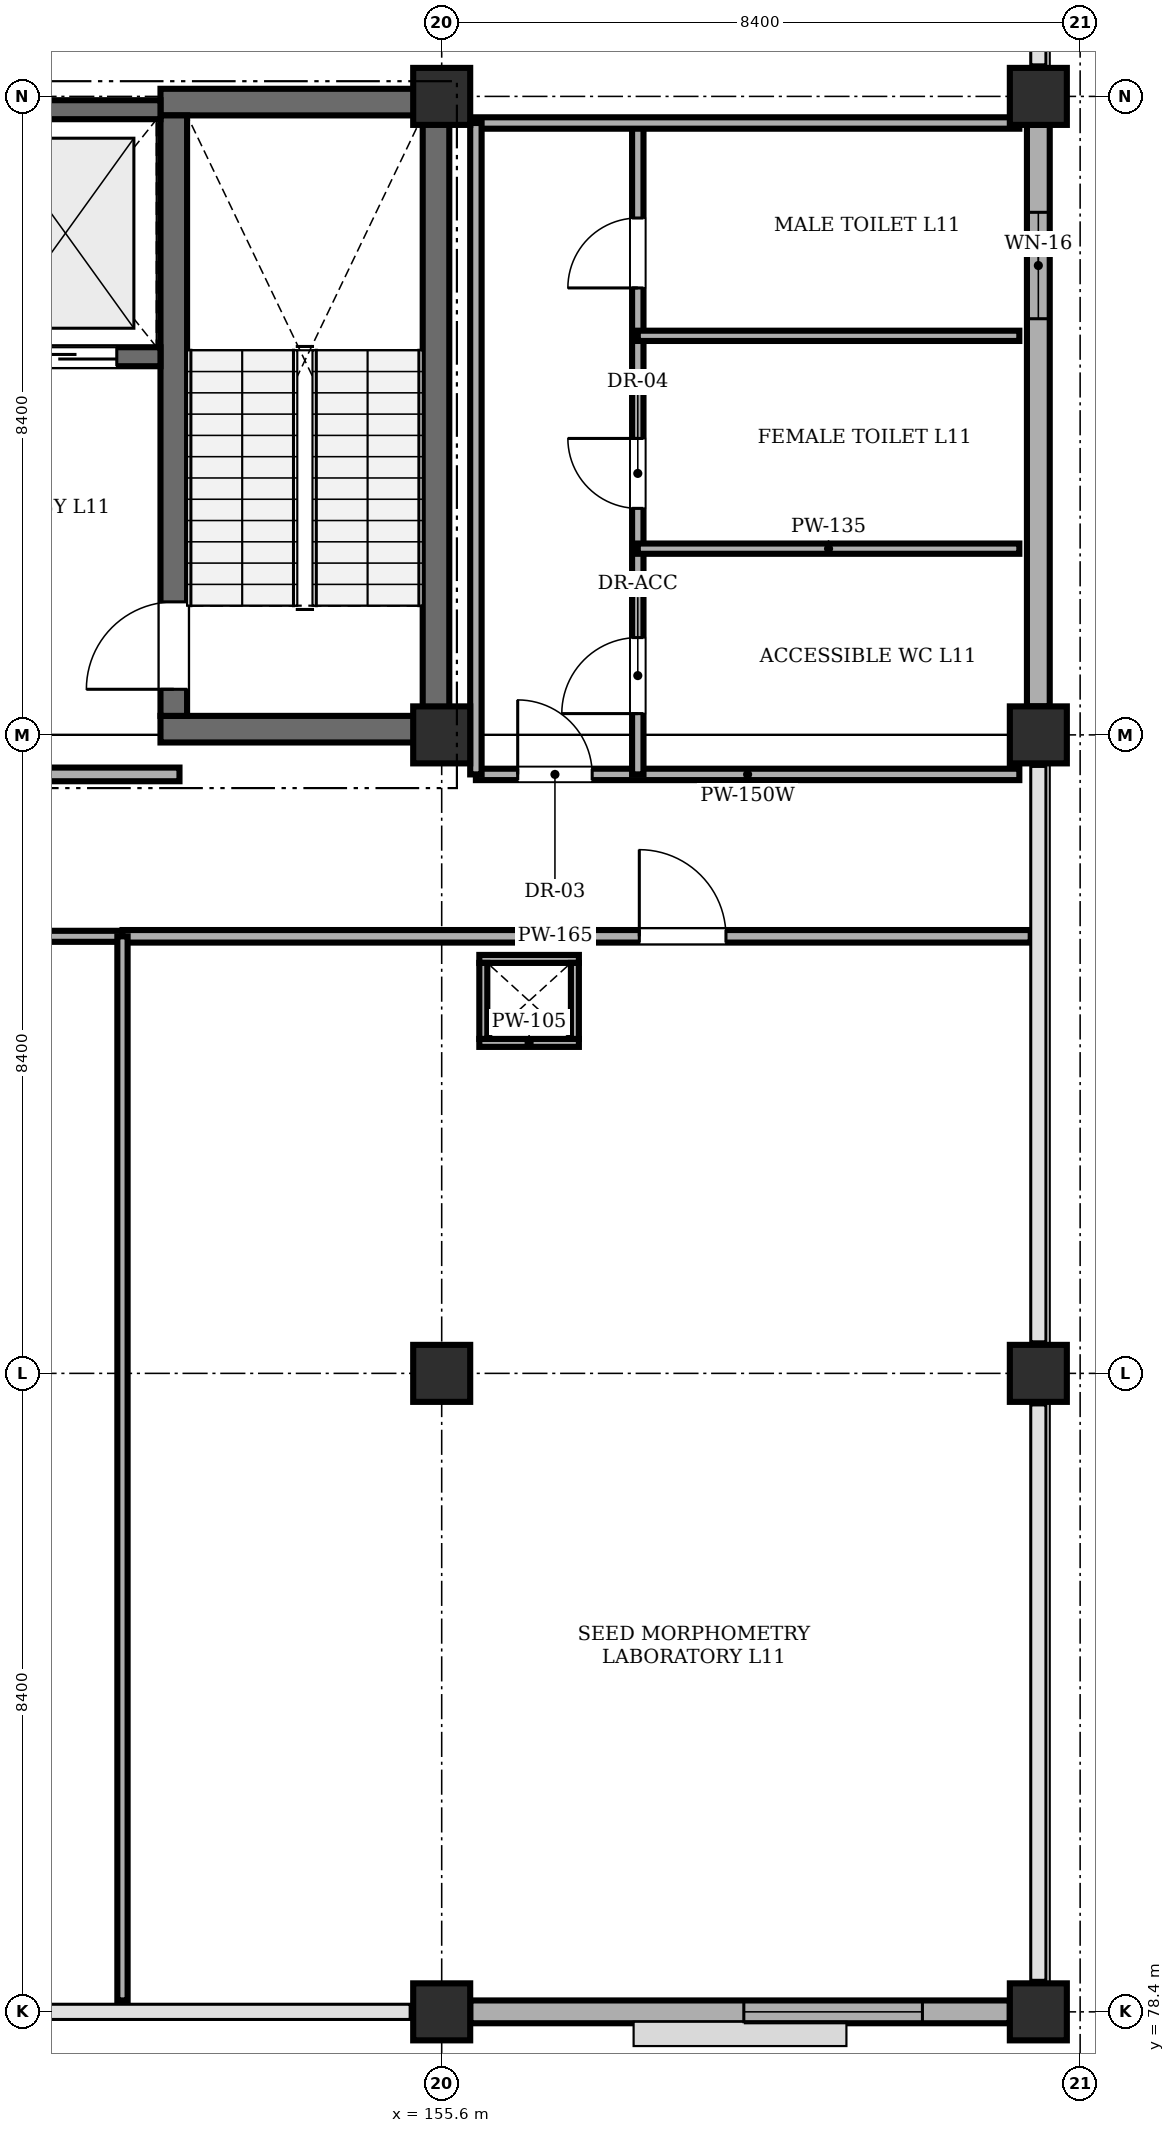
"""IFC4 building model, lengths in metres.
Left out: names, types, materials, properties, quantities, classifications, styles, units other than length and angle.
Written with IfcOpenShell. Run it as: python <this file> out.ifc"""

import sys

from ifc_helpers import new_model, si_unit, direction, frame, frame_2d, origin, origin_2d, place, context, subcontext, project, spatial, rectangle, extrude, element, fill, save


model = new_model("IFC4")
c1 = context("Model", 3, precision=1e-05, world=origin(), true_north=direction((0.0, 1.0)))
c2 = subcontext(c1, "Body", "Model", "MODEL_VIEW")
j1 = project(units=[si_unit("LENGTHUNIT", "METRE"), si_unit("PLANEANGLEUNIT", "RADIAN")], contexts=[c1])
p1 = place(None, origin())
s1 = spatial("IfcSite", under=j1, at=p1, CompositionType="ELEMENT")
p2 = place(p1, origin())
s2 = spatial("IfcBuilding", under=s1, at=p2, CompositionType="ELEMENT")
p3 = place(p2, frame((0.0, 0.0, 44.4)))
s3 = spatial("IfcBuildingStorey", under=s2, at=p3, CompositionType="ELEMENT", Elevation=44.4)
for number, where, z_axis, x_axis in (
    (1, (155.6, 78.4, 0.0), (0.0, 0.0, 1.0), (1.0, 0.0, 0.0)),
    (2, (155.6, 86.8, 0.0), (0.0, 0.0, 1.0), (1.0, 0.0, 0.0)),
    (3, (155.6, 95.2, 0.0), (0.0, 0.0, 1.0), (1.0, 0.0, 0.0)),
    (4, (155.6, 103.6, 0.0), (0.0, 0.0, 1.0), (1.0, 0.0, 0.0)),
    (5, (163.45, 78.4, 0.0), (0.0, 0.0, 1.0), (1.0, 0.0, 0.0)),
    (6, (163.45, 86.8, 0.0), (0.0, 0.0, 1.0), (1.0, 0.0, 0.0)),
    (7, (163.45, 95.2, 0.0), (0.0, 0.0, 1.0), (1.0, 0.0, 0.0)),
    (8, (163.45, 103.6, 0.0), (0.0, 0.0, 1.0), (1.0, 0.0, 0.0)),
):
    element("IfcColumn", number, at=place(p3, frame(where, z_axis=z_axis, x_axis=x_axis)), inside=s3, PredefinedType="COLUMN", context=c2, shape_type="SweptSolid", body=[
        extrude(rectangle(XDim=0.75, YDim=0.75, at=origin_2d()), origin(), (0.0, 0.0, 1.0), 4.01),
    ])
for number, where, z_axis, x_axis in (
    (9, (151.9, 95.275, 0.0), (0.0, 0.0, 1.0), (1.0, 0.0, 0.0)),
    (10, (151.9, 103.525, 0.0), (0.0, 0.0, 1.0), (1.0, 0.0, 0.0)),
):
    element("IfcWall", number, at=place(p3, frame(where, z_axis=z_axis, x_axis=x_axis)), inside=s3, PredefinedType="SHEAR", context=c2, shape_type="SweptSolid", body=[
        extrude(rectangle(XDim=3.8, YDim=0.35, at=frame_2d((1.9, 0.0))), origin(), (0.0, 0.0, 1.0), 4.01),
    ])
p4 = place(p3, frame((152.075, 95.45, 0.0), z_axis=(0.0, 0.0, 1.0), x_axis=(0.0, 1.0, 0.0)))
e11 = element("IfcWall", 11, at=p4, inside=s3, PredefinedType="SHEAR", context=c2, shape_type="SweptSolid", body=[
    extrude(rectangle(XDim=7.9, YDim=0.35, at=frame_2d((3.95, 0.0))), origin(), (0.0, 0.0, 1.0), 4.01),
])
p5 = place(p4, frame((0.35, 0.0, 0.0)))
e12 = element("IfcOpeningElement", 12, at=p5, cuts=e11, PredefinedType="OPENING", context=c2, shape_type="SweptSolid", body=[
    extrude(rectangle(XDim=1.15, YDim=2.15, at=frame_2d((0.575, 1.075))), frame((0.0, 0.185, 0.0), z_axis=(0.0, -1.0, 0.0), x_axis=(1.0, 0.0, 0.0)), (0.0, 0.0, 1.0), 0.37),
])
p6 = place(p3, frame((155.525, 95.45, 0.0), z_axis=(0.0, 0.0, 1.0), x_axis=(0.0, 1.0, 0.0)))
e13 = element("IfcWall", 13, at=p6, inside=s3, PredefinedType="SHEAR", context=c2, shape_type="SweptSolid", body=[
    extrude(rectangle(XDim=7.9, YDim=0.35, at=frame_2d((3.95, 0.0))), origin(), (0.0, 0.0, 1.0), 4.01),
])
p7 = place(p3, frame((149.45, 100.175, 0.0), z_axis=(0.0, 0.0, 1.0), x_axis=(1.0, 0.0, 0.0)))
e14 = element("IfcWall", 14, at=p7, inside=s3, PredefinedType="SHEAR", context=c2, shape_type="SweptSolid", body=[
    extrude(rectangle(XDim=2.45, YDim=0.25, at=frame_2d((1.225, 0.0))), origin(), (0.0, 0.0, 1.0), 4.01),
])
p8 = place(p7, frame((0.575, 0.0, 0.0)))
e15 = element("IfcOpeningElement", 15, at=p8, cuts=e14, PredefinedType="OPENING", context=c2, shape_type="SweptSolid", body=[
    extrude(rectangle(XDim=1.3, YDim=2.25, at=frame_2d((0.65, 1.125))), frame((0.0, 0.135, 0.0), z_axis=(0.0, -1.0, 0.0), x_axis=(1.0, 0.0, 0.0)), (0.0, 0.0, 1.0), 0.27),
])
p9 = place(p3, frame((149.45, 103.425, 0.0), z_axis=(0.0, 0.0, 1.0), x_axis=(1.0, 0.0, 0.0)))
e16 = element("IfcWall", 16, at=p9, inside=s3, PredefinedType="SHEAR", context=c2, shape_type="SweptSolid", body=[
    extrude(rectangle(XDim=2.45, YDim=0.25, at=frame_2d((1.225, 0.0))), origin(), (0.0, 0.0, 1.0), 4.01),
])
p10 = place(p3, frame((163.075, 78.4, 0.0), z_axis=(0.0, 0.0, 1.0), x_axis=(-1.0, 0.0, 0.0)))
e17 = element("IfcWall", 17, at=p10, inside=s3, PredefinedType="STANDARD", context=c2, shape_type="SweptSolid", body=[
    extrude(rectangle(XDim=7.1, YDim=0.3, at=frame_2d((3.55, 0.0))), origin(), (0.0, 0.0, 1.0), 3.31),
])
p11 = place(p10, frame((1.15, 0.0, 0.95)))
e18 = element("IfcOpeningElement", 18, at=p11, cuts=e17, PredefinedType="OPENING", context=c2, shape_type="SweptSolid", body=[
    extrude(rectangle(XDim=2.35, YDim=1.95, at=frame_2d((1.175, 0.975))), frame((0.0, 0.16, 0.0), z_axis=(0.0, -1.0, 0.0), x_axis=(1.0, 0.0, 0.0)), (0.0, 0.0, 1.0), 0.32),
])
p12 = place(p3, frame((163.45, 103.225, 0.0), z_axis=(0.0, 0.0, 1.0), x_axis=(0.0, -1.0, 0.0)))
e19 = element("IfcWall", 19, at=p12, inside=s3, PredefinedType="STANDARD", context=c2, shape_type="SweptSolid", body=[
    extrude(rectangle(XDim=7.65, YDim=0.3, at=frame_2d((3.825, 0.0))), origin(), (0.0, 0.0, 1.0), 3.31),
])
p13 = place(p12, frame((1.15, 0.0, 1.1)))
e20 = element("IfcOpeningElement", 20, at=p13, cuts=e19, PredefinedType="OPENING", context=c2, shape_type="SweptSolid", body=[
    extrude(rectangle(XDim=1.4, YDim=1.4, at=frame_2d((0.7, 0.7))), frame((0.0, 0.16, 0.0), z_axis=(0.0, -1.0, 0.0), x_axis=(1.0, 0.0, 0.0)), (0.0, 0.0, 1.0), 0.32),
])
p14 = place(p3, frame((147.3, 94.68, 0.0), z_axis=(0.0, 0.0, 1.0), x_axis=(1.0, 0.0, 0.0)))
e21 = element("IfcWall", 21, at=p14, inside=s3, PredefinedType="STANDARD", context=c2, shape_type="SweptSolid", body=[
    extrude(rectangle(XDim=4.85, YDim=0.18, at=frame_2d((2.425, 0.0))), origin(), (0.0, 0.0, 1.0), 4.01),
])
p15 = place(p14, frame((1.6, 0.0, 0.0)))
e22 = element("IfcOpeningElement", 22, at=p15, cuts=e21, PredefinedType="OPENING", context=c2, shape_type="SweptSolid", body=[
    extrude(rectangle(XDim=1.15, YDim=2.15, at=frame_2d((0.575, 1.075))), frame((0.0, 0.1, 0.0), z_axis=(0.0, -1.0, 0.0), x_axis=(1.0, 0.0, 0.0)), (0.0, 0.0, 1.0), 0.2),
])
p16 = place(p3, frame((156.05, 94.68, 0.0), z_axis=(0.0, 0.0, 1.0), x_axis=(1.0, 0.0, 0.0)))
e23 = element("IfcWall", 23, at=p16, inside=s3, PredefinedType="PARTITIONING", context=c2, shape_type="SweptSolid", body=[
    extrude(rectangle(XDim=7.15, YDim=0.15, at=frame_2d((3.575, 0.0))), origin(), (0.0, 0.0, 1.0), 4.01),
])
p17 = place(p16, frame((0.55, 0.0, 0.0)))
e24 = element("IfcOpeningElement", 24, at=p17, cuts=e23, PredefinedType="OPENING", context=c2, shape_type="SweptSolid", body=[
    extrude(rectangle(XDim=0.98, YDim=2.12, at=frame_2d((0.49, 1.06))), frame((0.0, 0.085, 0.0), z_axis=(0.0, -1.0, 0.0), x_axis=(1.0, 0.0, 0.0)), (0.0, 0.0, 1.0), 0.17),
])
p18 = place(p3, frame((158.18, 94.68, 0.0), z_axis=(0.0, 0.0, 1.0), x_axis=(0.0, 1.0, 0.0)))
e25 = element("IfcWall", 25, at=p18, inside=s3, PredefinedType="PARTITIONING", context=c2, shape_type="SweptSolid", body=[
    extrude(rectangle(XDim=8.57, YDim=0.15, at=frame_2d((4.285, 0.0))), origin(), (0.0, 0.0, 1.0), 4.01),
])
p19 = place(p18, frame((0.8, 0.0, 0.0)))
e26 = element("IfcOpeningElement", 26, at=p19, cuts=e25, PredefinedType="OPENING", context=c2, shape_type="SweptSolid", body=[
    extrude(rectangle(XDim=1.0, YDim=2.12, at=frame_2d((0.5, 1.06))), frame((0.0, 0.085, 0.0), z_axis=(0.0, -1.0, 0.0), x_axis=(1.0, 0.0, 0.0)), (0.0, 0.0, 1.0), 0.17),
])
p20 = place(p18, frame((3.5, 0.0, 0.0)))
e27 = element("IfcOpeningElement", 27, at=p20, cuts=e25, PredefinedType="OPENING", context=c2, shape_type="SweptSolid", body=[
    extrude(rectangle(XDim=0.92, YDim=2.1, at=frame_2d((0.46, 1.05))), frame((0.0, 0.085, 0.0), z_axis=(0.0, -1.0, 0.0), x_axis=(1.0, 0.0, 0.0)), (0.0, 0.0, 1.0), 0.17),
])
p21 = place(p18, frame((6.4, 0.0, 0.0)))
e28 = element("IfcOpeningElement", 28, at=p21, cuts=e25, PredefinedType="OPENING", context=c2, shape_type="SweptSolid", body=[
    extrude(rectangle(XDim=0.92, YDim=2.1, at=frame_2d((0.46, 1.05))), frame((0.0, 0.085, 0.0), z_axis=(0.0, -1.0, 0.0), x_axis=(1.0, 0.0, 0.0)), (0.0, 0.0, 1.0), 0.17),
])
for number, where, z_axis, x_axis in (
    (29, (158.18, 97.65, 0.0), (0.0, 0.0, 1.0), (1.0, 0.0, 0.0)),
    (30, (158.18, 100.45, 0.0), (0.0, 0.0, 1.0), (1.0, 0.0, 0.0)),
):
    element("IfcWall", number, at=place(p3, frame(where, z_axis=z_axis, x_axis=x_axis)), inside=s3, PredefinedType="PARTITIONING", context=c2, shape_type="SweptSolid", body=[
        extrude(rectangle(XDim=5.02, YDim=0.135, at=frame_2d((2.51, 0.0))), origin(), (0.0, 0.0, 1.0), 4.01),
    ])
p22 = place(p3, frame((156.05, 103.25, 0.0), z_axis=(0.0, 0.0, 1.0), x_axis=(1.0, 0.0, 0.0)))
e31 = element("IfcWall", 31, at=p22, inside=s3, PredefinedType="PARTITIONING", context=c2, shape_type="SweptSolid", body=[
    extrude(rectangle(XDim=7.15, YDim=0.15, at=frame_2d((3.575, 0.0))), origin(), (0.0, 0.0, 1.0), 4.01),
])
p23 = place(p3, frame((156.05, 94.68, 0.0), z_axis=(0.0, 0.0, 1.0), x_axis=(0.0, 1.0, 0.0)))
e32 = element("IfcWall", 32, at=p23, inside=s3, PredefinedType="PARTITIONING", context=c2, shape_type="SweptSolid", body=[
    extrude(rectangle(XDim=8.57, YDim=0.15, at=frame_2d((4.285, 0.0))), origin(), (0.0, 0.0, 1.0), 4.01),
])
p24 = place(p3, frame((138.95, 92.55, 0.0), z_axis=(0.0, 0.0, 1.0), x_axis=(1.0, 0.0, 0.0)))
e33 = element("IfcWall", 33, at=p24, inside=s3, PredefinedType="PARTITIONING", context=c2, shape_type="SweptSolid", body=[
    extrude(rectangle(XDim=12.45, YDim=0.145, at=frame_2d((6.225, 0.0))), origin(), (0.0, 0.0, 1.0), 4.01),
])
p25 = place(p24, frame((3.65, 0.0, 0.0)))
e34 = element("IfcOpeningElement", 34, at=p25, cuts=e33, PredefinedType="OPENING", context=c2, shape_type="SweptSolid", body=[
    extrude(rectangle(XDim=1.08, YDim=2.15, at=frame_2d((0.54, 1.075))), frame((0.0, 0.083, 0.0), z_axis=(0.0, -1.0, 0.0), x_axis=(1.0, 0.0, 0.0)), (0.0, 0.0, 1.0), 0.165),
])
p26 = place(p3, frame((151.4, 92.55, 0.0), z_axis=(0.0, 0.0, 1.0), x_axis=(1.0, 0.0, 0.0)))
e35 = element("IfcWall", 35, at=p26, inside=s3, PredefinedType="PARTITIONING", context=c2, shape_type="SweptSolid", body=[
    extrude(rectangle(XDim=11.95, YDim=0.165, at=frame_2d((5.975, 0.0))), origin(), (0.0, 0.0, 1.0), 4.01),
])
p27 = place(p26, frame((6.8, 0.0, 0.0)))
e36 = element("IfcOpeningElement", 36, at=p27, cuts=e35, PredefinedType="OPENING", context=c2, shape_type="SweptSolid", body=[
    extrude(rectangle(XDim=1.14, YDim=2.18, at=frame_2d((0.57, 1.09))), frame((0.0, 0.093, 0.0), z_axis=(0.0, -1.0, 0.0), x_axis=(1.0, 0.0, 0.0)), (0.0, 0.0, 1.0), 0.185),
])
p28 = place(p3, frame((151.4, 78.55, 0.0), z_axis=(0.0, 0.0, 1.0), x_axis=(0.0, 1.0, 0.0)))
e37 = element("IfcWall", 37, at=p28, inside=s3, PredefinedType="PARTITIONING", context=c2, shape_type="SweptSolid", body=[
    extrude(rectangle(XDim=14.0, YDim=0.135, at=frame_2d((7.0, 0.0))), origin(), (0.0, 0.0, 1.0), 3.56),
])
for number, where, z_axis, x_axis in (
    (38, (156.095, 91.147, 0.0), (0.0, 0.0, 1.0), (1.0, 0.0, 0.0)),
    (39, (156.095, 92.252, 0.0), (0.0, 0.0, 1.0), (1.0, 0.0, 0.0)),
):
    element("IfcWall", number, at=place(p3, frame(where, z_axis=z_axis, x_axis=x_axis)), inside=s3, PredefinedType="PARTITIONING", context=c2, shape_type="SweptSolid", body=[
        extrude(rectangle(XDim=1.31, YDim=0.105, at=frame_2d((0.655, 0.0))), origin(), (0.0, 0.0, 1.0), 4.01),
    ])
for number, where, z_axis, x_axis in (
    (40, (156.147, 91.2, 0.0), (0.0, 0.0, 1.0), (0.0, 1.0, 0.0)),
    (41, (157.353, 91.2, 0.0), (0.0, 0.0, 1.0), (0.0, 1.0, 0.0)),
):
    element("IfcWall", number, at=place(p3, frame(where, z_axis=z_axis, x_axis=x_axis)), inside=s3, PredefinedType="PARTITIONING", context=c2, shape_type="SweptSolid", body=[
        extrude(rectangle(XDim=1.0, YDim=0.105, at=frame_2d((0.5, 0.0))), origin(), (0.0, 0.0, 1.0), 4.01),
    ])
p29 = place(p11, origin())
e42 = element("IfcWindow", 42, at=p29, inside=s3, PartitioningType="TRIPLE_PANEL_VERTICAL", PredefinedType="WINDOW", context=c2, shape_type="SweptSolid", body=[
    extrude(rectangle(XDim=2.35, YDim=1.95, at=frame_2d((1.175, 0.975))), frame((0.0, 0.03, 0.0), z_axis=(0.0, -1.0, 0.0), x_axis=(1.0, 0.0, 0.0)), (0.0, 0.0, 1.0), 0.06),
])
fill(e18, e42)
p30 = place(p13, origin())
e43 = element("IfcWindow", 43, at=p30, inside=s3, PartitioningType="SINGLE_PANEL", PredefinedType="WINDOW", context=c2, shape_type="SweptSolid", body=[
    extrude(rectangle(XDim=1.4, YDim=1.4, at=frame_2d((0.7, 0.7))), frame((0.0, 0.03, 0.0), z_axis=(0.0, -1.0, 0.0), x_axis=(1.0, 0.0, 0.0)), (0.0, 0.0, 1.0), 0.06),
])
fill(e20, e43)
p31 = place(p17, origin())
e44 = element("IfcDoor", 44, at=p31, inside=s3, OperationType="SINGLE_SWING_LEFT", PredefinedType="DOOR", context=c2, shape_type="SweptSolid", body=[
    extrude(rectangle(XDim=0.98, YDim=2.12, at=frame_2d((0.49, 1.06))), frame((0.0, 0.025, 0.0), z_axis=(0.0, -1.0, 0.0), x_axis=(1.0, 0.0, 0.0)), (0.0, 0.0, 1.0), 0.05),
])
fill(e24, e44)
p32 = place(p19, origin())
e45 = element("IfcDoor", 45, at=p32, inside=s3, OperationType="SINGLE_SWING_LEFT", PredefinedType="DOOR", context=c2, shape_type="SweptSolid", body=[
    extrude(rectangle(XDim=1.0, YDim=2.12, at=frame_2d((0.5, 1.06))), frame((0.0, 0.025, 0.0), z_axis=(0.0, -1.0, 0.0), x_axis=(1.0, 0.0, 0.0)), (0.0, 0.0, 1.0), 0.05),
])
fill(e26, e45)
p33 = place(p20, origin())
e46 = element("IfcDoor", 46, at=p33, inside=s3, OperationType="SINGLE_SWING_RIGHT", PredefinedType="DOOR", context=c2, shape_type="SweptSolid", body=[
    extrude(rectangle(XDim=0.92, YDim=2.1, at=frame_2d((0.46, 1.05))), frame((0.0, 0.025, 0.0), z_axis=(0.0, -1.0, 0.0), x_axis=(1.0, 0.0, 0.0)), (0.0, 0.0, 1.0), 0.05),
])
fill(e27, e46)
p34 = place(p21, origin())
e47 = element("IfcDoor", 47, at=p34, inside=s3, OperationType="SINGLE_SWING_LEFT", PredefinedType="DOOR", context=c2, shape_type="SweptSolid", body=[
    extrude(rectangle(XDim=0.92, YDim=2.1, at=frame_2d((0.46, 1.05))), frame((0.0, 0.025, 0.0), z_axis=(0.0, -1.0, 0.0), x_axis=(1.0, 0.0, 0.0)), (0.0, 0.0, 1.0), 0.05),
])
fill(e28, e47)
p35 = place(p27, origin())
e48 = element("IfcDoor", 48, at=p35, inside=s3, OperationType="SINGLE_SWING_LEFT", PredefinedType="DOOR", context=c2, shape_type="SweptSolid", body=[
    extrude(rectangle(XDim=1.14, YDim=2.18, at=frame_2d((0.57, 1.09))), frame((0.0, 0.025, 0.0), z_axis=(0.0, -1.0, 0.0), x_axis=(1.0, 0.0, 0.0)), (0.0, 0.0, 1.0), 0.05),
])
fill(e36, e48)
p36 = place(p5, origin())
e49 = element("IfcDoor", 49, at=p36, inside=s3, OperationType="SINGLE_SWING_LEFT", PredefinedType="DOOR", context=c2, shape_type="SweptSolid", body=[
    extrude(rectangle(XDim=1.15, YDim=2.15, at=frame_2d((0.575, 1.075))), frame((0.0, 0.025, 0.0), z_axis=(0.0, -1.0, 0.0), x_axis=(1.0, 0.0, 0.0)), (0.0, 0.0, 1.0), 0.05),
])
fill(e12, e49)
p37 = place(p8, origin())
e50 = element("IfcDoor", 50, at=p37, inside=s3, OperationType="SLIDING_TO_LEFT", PredefinedType="DOOR", context=c2, shape_type="SweptSolid", body=[
    extrude(rectangle(XDim=1.3, YDim=2.25, at=frame_2d((0.65, 1.125))), frame((0.0, 0.025, 0.0), z_axis=(0.0, -1.0, 0.0), x_axis=(1.0, 0.0, 0.0)), (0.0, 0.0, 1.0), 0.05),
])
fill(e15, e50)
save(model, sys.argv[1])
